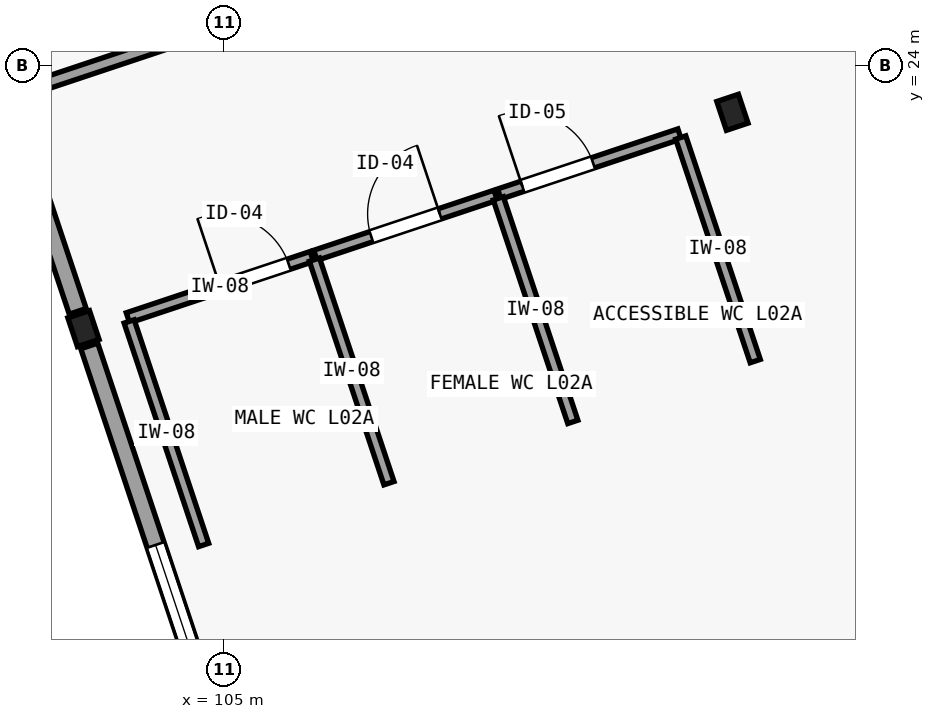
"""IFC4 building model, lengths in metres.
Left out: names, types, materials, properties, quantities, classifications, styles, units other than length and angle.
Written with IfcOpenShell. Run it as: python <this file> out.ifc"""

import sys

from ifc_helpers import new_model, si_unit, direction, frame, frame_2d, origin, origin_2d, place, context, subcontext, project, spatial, rectangle, i_section, extrude, element, fill, save


model = new_model("IFC4")
c1 = context("Model", 3, precision=1e-05, world=origin(), true_north=direction((0.0, 1.0)))
c2 = subcontext(c1, "Body", "Model", "MODEL_VIEW")
j1 = project(units=[si_unit("LENGTHUNIT", "METRE"), si_unit("PLANEANGLEUNIT", "RADIAN")], contexts=[c1])
p1 = place(None, origin())
s1 = spatial("IfcSite", under=j1, at=p1, CompositionType="ELEMENT")
p2 = place(p1, origin())
s2 = spatial("IfcBuilding", under=s1, at=p2, CompositionType="ELEMENT")
p3 = place(p2, frame((0.0, 0.0, 5.4)))
s3 = spatial("IfcBuildingStorey", under=s2, at=p3, CompositionType="ELEMENT", Elevation=5.4)
for number, where, z_axis, x_axis in (
    (1, (103.154, 20.538, 0.0), (0.0, 0.0, 1.0), (0.949, 0.316, 0.0)),
    (2, (111.692, 23.384, 0.0), (0.0, 0.0, 1.0), (0.949, 0.316, 0.0)),
):
    element("IfcColumn", number, at=place(p3, frame(where, z_axis=z_axis, x_axis=x_axis)), inside=s3, PredefinedType="COLUMN", context=c2, shape_type="SweptSolid", body=[
        extrude(i_section(OverallWidth=0.3, OverallDepth=0.4, WebThickness=0.013, FlangeThickness=0.024, FilletRadius=0.027, at=origin_2d()), origin(), (0.0, 0.0, 1.0), 4.5),
    ])
p4 = place(p3, frame((105.924, 12.228, 0.0), z_axis=(0.0, 0.0, 1.0), x_axis=(-0.316236362498, 0.948680432514, 0.0)))
e3 = element("IfcWall", 3, at=p4, inside=s3, PredefinedType="SOLIDWALL", context=c2, shape_type="SweptSolid", body=[
    extrude(rectangle(XDim=8.52, YDim=0.235, at=frame_2d((4.26, 0.0))), origin(), (0.0, 0.0, 1.0), 3.825),
])
p5 = place(p4, frame((2.76, 0.0, 1.05)))
e4 = element("IfcOpeningElement", 4, at=p5, cuts=e3, PredefinedType="OPENING", context=c2, shape_type="SweptSolid", body=[
    extrude(rectangle(XDim=3.0, YDim=1.8, at=frame_2d((1.5, 0.9))), frame((0.0, 0.127, 0.0), z_axis=(0.0, -1.0, 0.0), x_axis=(1.0, 0.0, 0.0)), (0.0, 0.0, 1.0), 0.255),
])
p6 = place(p3, frame((103.078, 20.766, 0.0), z_axis=(0.0, 0.0, 1.0), x_axis=(-0.316236362498, 0.948680432514, 0.0)))
e5 = element("IfcWall", 5, at=p6, inside=s3, PredefinedType="SOLIDWALL", context=c2, shape_type="SweptSolid", body=[
    extrude(rectangle(XDim=8.52, YDim=0.235, at=frame_2d((4.26, 0.0))), origin(), (0.0, 0.0, 1.0), 3.825),
])
p7 = place(p6, frame((2.76, 0.0, 1.05)))
e6 = element("IfcOpeningElement", 6, at=p7, cuts=e5, PredefinedType="OPENING", context=c2, shape_type="SweptSolid", body=[
    extrude(rectangle(XDim=3.0, YDim=1.8, at=frame_2d((1.5, 0.9))), frame((0.0, 0.127, 0.0), z_axis=(0.0, -1.0, 0.0), x_axis=(1.0, 0.0, 0.0)), (0.0, 0.0, 1.0), 0.255),
])
p8 = place(p3, frame((103.739, 20.68, 0.0), z_axis=(0.0, 0.0, 1.0), x_axis=(0.948683298051, 0.316227766017, 0.0)))
e7 = element("IfcWall", 7, at=p8, inside=s3, PredefinedType="PARTITIONING", context=c2, shape_type="SweptSolid", body=[
    extrude(rectangle(XDim=2.55, YDim=0.14, at=frame_2d((1.275, 0.0))), origin(), (0.0, 0.0, 1.0), 3.64),
])
p9 = place(p8, frame((1.28, 0.0, 0.0)))
e8 = element("IfcOpeningElement", 8, at=p9, cuts=e7, PredefinedType="OPENING", context=c2, shape_type="SweptSolid", body=[
    extrude(rectangle(XDim=0.95, YDim=2.1, at=frame_2d((0.475, 1.05))), frame((0.0, 0.08, 0.0), z_axis=(0.0, -1.0, 0.0), x_axis=(1.0, 0.0, 0.0)), (0.0, 0.0, 1.0), 0.16),
])
p10 = place(p3, frame((106.206, 21.503, 0.0), z_axis=(0.0, 0.0, 1.0), x_axis=(0.948683298051, 0.316227766017, 0.0)))
e9 = element("IfcWall", 9, at=p10, inside=s3, PredefinedType="PARTITIONING", context=c2, shape_type="SweptSolid", body=[
    extrude(rectangle(XDim=2.5, YDim=0.14, at=frame_2d((1.25, 0.0))), origin(), (0.0, 0.0, 1.0), 3.64),
])
p11 = place(p10, frame((0.775, 0.0, 0.0)))
e10 = element("IfcOpeningElement", 10, at=p11, cuts=e9, PredefinedType="OPENING", context=c2, shape_type="SweptSolid", body=[
    extrude(rectangle(XDim=0.95, YDim=2.1, at=frame_2d((0.475, 1.05))), frame((0.0, 0.08, 0.0), z_axis=(0.0, -1.0, 0.0), x_axis=(1.0, 0.0, 0.0)), (0.0, 0.0, 1.0), 0.16),
])
p12 = place(p3, frame((108.625, 22.309, 0.0), z_axis=(0.0, 0.0, 1.0), x_axis=(0.948683298051, 0.316227766017, 0.0)))
e11 = element("IfcWall", 11, at=p12, inside=s3, PredefinedType="PARTITIONING", context=c2, shape_type="SweptSolid", body=[
    extrude(rectangle(XDim=2.5, YDim=0.14, at=frame_2d((1.25, 0.0))), origin(), (0.0, 0.0, 1.0), 3.64),
])
p13 = place(p12, frame((0.32, 0.0, 0.0)))
e12 = element("IfcOpeningElement", 12, at=p13, cuts=e11, PredefinedType="OPENING", context=c2, shape_type="SweptSolid", body=[
    extrude(rectangle(XDim=0.98, YDim=2.15, at=frame_2d((0.49, 1.075))), frame((0.0, 0.08, 0.0), z_axis=(0.0, -1.0, 0.0), x_axis=(1.0, 0.0, 0.0)), (0.0, 0.0, 1.0), 0.16),
])
for number, where, z_axis, x_axis in (
    (13, (107.173, 18.505, 0.0), (0.0, 0.0, 1.0), (-0.316, 0.949, 0.0)),
    (14, (109.592, 19.311, 0.0), (0.0, 0.0, 1.0), (-0.316, 0.949, 0.0)),
    (15, (104.735, 17.692, 0.0), (0.0, 0.0, 1.0), (-0.316, 0.949, 0.0)),
    (16, (111.992, 20.111, 0.0), (0.0, 0.0, 1.0), (-0.316, 0.949, 0.0)),
):
    element("IfcWall", number, at=place(p3, frame(where, z_axis=z_axis, x_axis=x_axis)), inside=s3, PredefinedType="PARTITIONING", context=c2, shape_type="SweptSolid", body=[
        extrude(rectangle(XDim=3.1, YDim=0.14, at=frame_2d((1.55, 0.0))), origin(), (0.0, 0.0, 1.0), 3.64),
    ])
p14 = place(p3, frame((102.61, 23.751, 0.0), z_axis=(0.0, 0.0, 1.0), x_axis=(0.948683298051, 0.316227766017, 0.0)))
e17 = element("IfcWall", 17, at=p14, inside=s3, PredefinedType="PARTITIONING", context=c2, shape_type="SweptSolid", body=[
    extrude(rectangle(XDim=35.5, YDim=0.16, at=frame_2d((17.75, 0.0))), origin(), (0.0, 0.0, 1.0), 3.64),
])
p15 = place(p14, frame((11.713, 0.0, 0.0)))
e18 = element("IfcOpeningElement", 18, at=p15, cuts=e17, PredefinedType="OPENING", context=c2, shape_type="SweptSolid", body=[
    extrude(rectangle(XDim=1.05, YDim=2.15, at=frame_2d((0.525, 1.075))), frame((0.0, 0.09, 0.0), z_axis=(0.0, -1.0, 0.0), x_axis=(1.0, 0.0, 0.0)), (0.0, 0.0, 1.0), 0.18),
])
p16 = place(p5, origin())
e19 = element("IfcWindow", 19, at=p16, inside=s3, PartitioningType="SINGLE_PANEL", PredefinedType="WINDOW", context=c2, shape_type="SweptSolid", body=[
    extrude(rectangle(XDim=3.0, YDim=1.8, at=frame_2d((1.5, 0.9))), frame((0.0, 0.03, 0.0), z_axis=(0.0, -1.0, 0.0), x_axis=(1.0, 0.0, 0.0)), (0.0, 0.0, 1.0), 0.06),
])
fill(e4, e19)
p17 = place(p9, origin())
e20 = element("IfcDoor", 20, at=p17, inside=s3, OperationType="SINGLE_SWING_LEFT", PredefinedType="DOOR", context=c2, shape_type="SweptSolid", body=[
    extrude(rectangle(XDim=0.95, YDim=2.1, at=frame_2d((0.475, 1.05))), frame((0.0, 0.025, 0.0), z_axis=(0.0, -1.0, 0.0), x_axis=(1.0, 0.0, 0.0)), (0.0, 0.0, 1.0), 0.05),
])
fill(e8, e20)
p18 = place(p11, origin())
e21 = element("IfcDoor", 21, at=p18, inside=s3, OperationType="SINGLE_SWING_RIGHT", PredefinedType="DOOR", context=c2, shape_type="SweptSolid", body=[
    extrude(rectangle(XDim=0.95, YDim=2.1, at=frame_2d((0.475, 1.05))), frame((0.0, 0.025, 0.0), z_axis=(0.0, -1.0, 0.0), x_axis=(1.0, 0.0, 0.0)), (0.0, 0.0, 1.0), 0.05),
])
fill(e10, e21)
p19 = place(p13, origin())
e22 = element("IfcDoor", 22, at=p19, inside=s3, OperationType="SINGLE_SWING_LEFT", PredefinedType="DOOR", context=c2, shape_type="SweptSolid", body=[
    extrude(rectangle(XDim=0.98, YDim=2.15, at=frame_2d((0.49, 1.075))), frame((0.0, 0.025, 0.0), z_axis=(0.0, -1.0, 0.0), x_axis=(1.0, 0.0, 0.0)), (0.0, 0.0, 1.0), 0.05),
])
fill(e12, e22)
save(model, sys.argv[1])
